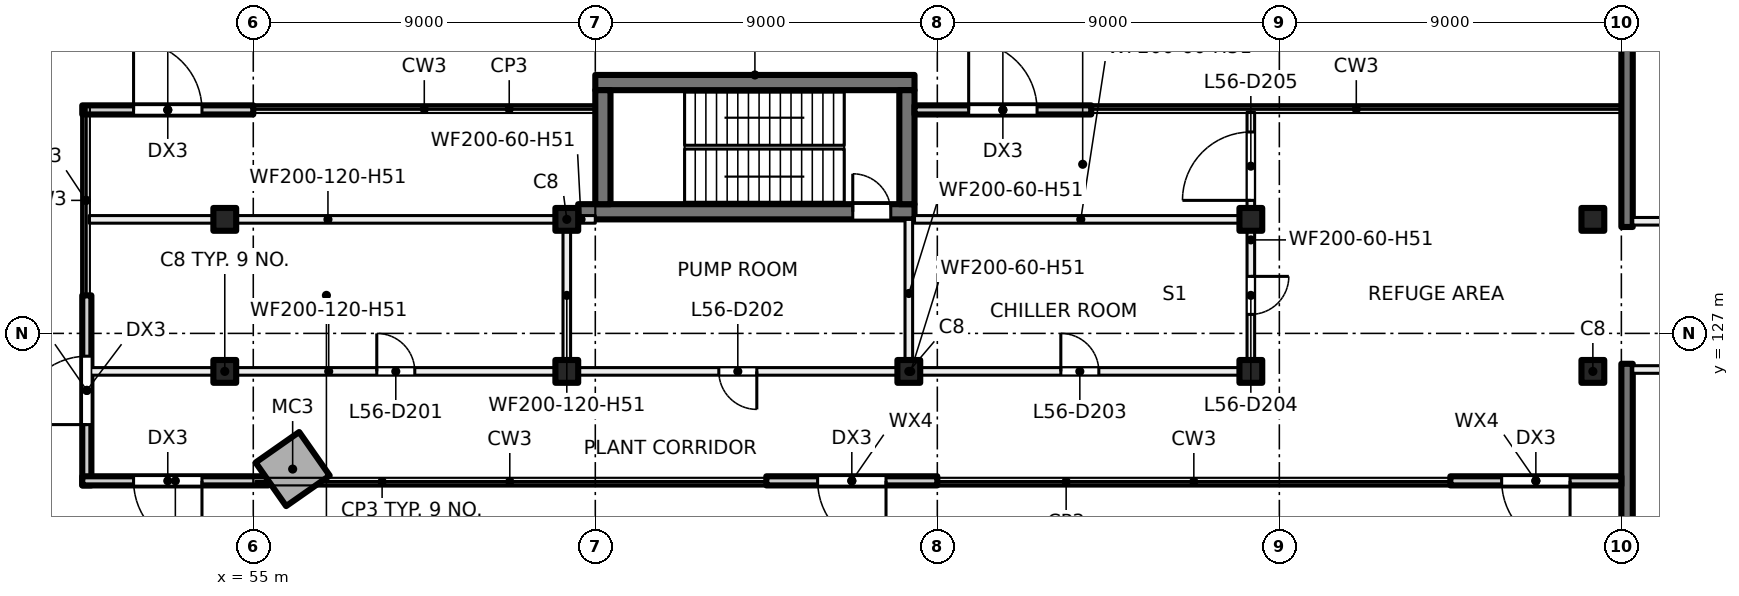
"""IFC4 building model, lengths in metres.
Left out: names, types, materials, properties, quantities, classifications, styles, units other than length and angle.
Written with IfcOpenShell. Run it as: python <this file> out.ifc"""

import sys

from ifc_helpers import new_model, si_unit, direction, frame, frame_2d, origin, origin_2d, place, context, subcontext, project, spatial, rectangle, hollow_rectangle, extrude, element, fill, save


model = new_model("IFC4")
c1 = context("Model", 3, precision=1e-05, world=origin(), true_north=direction((0.0, 1.0)))
c2 = subcontext(c1, "Body", "Model", "MODEL_VIEW")
j1 = project(units=[si_unit("LENGTHUNIT", "METRE"), si_unit("PLANEANGLEUNIT", "RADIAN")], contexts=[c1])
p1 = place(None, origin())
s1 = spatial("IfcSite", under=j1, at=p1, CompositionType="ELEMENT")
p2 = place(p1, origin())
s2 = spatial("IfcBuilding", under=s1, at=p2, CompositionType="ELEMENT")
p3 = place(p2, frame((0.0, 0.0, 236.0)))
s3 = spatial("IfcBuildingStorey", under=s2, at=p3, CompositionType="ELEMENT", Elevation=236.0)
p4 = place(p3, frame((56.036, 123.43, 0.0), z_axis=(0.0, 0.0, 1.0), x_axis=(0.573576436351, -0.819152044289, 0.0)))
e1 = element("IfcColumn", 1, at=p4, inside=s3, PredefinedType="COLUMN", context=c2, shape_type="SweptSolid", body=[
    extrude(hollow_rectangle(XDim=1.4, YDim=1.4, WallThickness=0.032, at=origin_2d()), origin(), (0.0, 0.0, 1.0), 5.5),
])
for number, where, z_axis, x_axis in (
    (2, (54.25, 130.0, 0.0), (0.0, 0.0, 1.0), (1.0, 0.0, 0.0)),
    (3, (63.25, 130.0, 0.0), (0.0, 0.0, 1.0), (1.0, 0.0, 0.0)),
    (4, (81.25, 130.0, 0.0), (0.0, 0.0, 1.0), (1.0, 0.0, 0.0)),
    (5, (90.25, 130.0, 0.0), (0.0, 0.0, 1.0), (1.0, 0.0, 0.0)),
    (6, (54.25, 126.0, 0.0), (0.0, 0.0, 1.0), (1.0, 0.0, 0.0)),
    (7, (63.25, 126.0, 0.0), (0.0, 0.0, 1.0), (1.0, 0.0, 0.0)),
    (8, (72.25, 126.0, 0.0), (0.0, 0.0, 1.0), (1.0, 0.0, 0.0)),
    (9, (81.25, 126.0, 0.0), (0.0, 0.0, 1.0), (1.0, 0.0, 0.0)),
    (10, (90.25, 126.0, 0.0), (0.0, 0.0, 1.0), (1.0, 0.0, 0.0)),
):
    element("IfcColumn", number, at=place(p3, frame(where, z_axis=z_axis, x_axis=x_axis)), inside=s3, PredefinedType="COLUMN", context=c2, shape_type="SweptSolid", body=[
        extrude(rectangle(XDim=0.6, YDim=0.6, at=origin_2d()), origin(), (0.0, 0.0, 1.0), 5.5),
    ])
for number, where, z_axis, x_axis in (
    (11, (91.15, 138.5, 0.0), (0.0, 0.0, 1.0), (0.0, -1.0, 0.0)),
    (12, (91.15, 126.2, 0.0), (0.0, 0.0, 1.0), (0.0, -1.0, 0.0)),
):
    element("IfcWall", number, at=place(p3, frame(where, z_axis=z_axis, x_axis=x_axis)), inside=s3, PredefinedType="SHEAR", context=c2, shape_type="SweptSolid", body=[
        extrude(rectangle(XDim=8.7, YDim=0.3, at=frame_2d((4.35, 0.0))), origin(), (0.0, 0.0, 1.0), 5.5),
    ])
p5 = place(p3, frame((63.55, 130.2, 0.0), z_axis=(0.0, 0.0, 1.0), x_axis=(1.0, 0.0, 0.0)))
e13 = element("IfcWall", 13, at=p5, inside=s3, PredefinedType="SHEAR", context=c2, shape_type="SweptSolid", body=[
    extrude(rectangle(XDim=8.85, YDim=0.4, at=frame_2d((4.425, 0.0))), origin(), (0.0, 0.0, 1.0), 5.5),
])
p6 = place(p5, frame((7.225, 0.0, 0.0)))
e14 = element("IfcOpeningElement", 14, at=p6, cuts=e13, PredefinedType="OPENING", context=c2, shape_type="SweptSolid", body=[
    extrude(rectangle(XDim=1.0, YDim=2.1, at=frame_2d((0.5, 1.05))), frame((0.0, 0.21, 0.0), z_axis=(0.0, -1.0, 0.0), x_axis=(1.0, 0.0, 0.0)), (0.0, 0.0, 1.0), 0.42),
])
p7 = place(p3, frame((64.0, 133.6, 0.0), z_axis=(0.0, 0.0, 1.0), x_axis=(1.0, 0.0, 0.0)))
e15 = element("IfcWall", 15, at=p7, inside=s3, PredefinedType="SHEAR", context=c2, shape_type="SweptSolid", body=[
    extrude(rectangle(XDim=8.4, YDim=0.4, at=frame_2d((4.2, 0.0))), origin(), (0.0, 0.0, 1.0), 5.5),
])
for number, where, z_axis, x_axis in (
    (16, (64.2, 130.4, 0.0), (0.0, 0.0, 1.0), (0.0, 1.0, 0.0)),
    (17, (72.2, 130.4, 0.0), (0.0, 0.0, 1.0), (0.0, 1.0, 0.0)),
):
    element("IfcWall", number, at=place(p3, frame(where, z_axis=z_axis, x_axis=x_axis)), inside=s3, PredefinedType="SHEAR", context=c2, shape_type="SweptSolid", body=[
        extrude(rectangle(XDim=3.0, YDim=0.4, at=frame_2d((1.5, 0.0))), origin(), (0.0, 0.0, 1.0), 5.5),
    ])
p8 = place(p3, frame((50.5, 132.88, 0.0), z_axis=(0.0, 0.0, 1.0), x_axis=(1.0, 0.0, 0.0)))
e18 = element("IfcWall", 18, at=p8, inside=s3, PredefinedType="SOLIDWALL", context=c2, shape_type="SweptSolid", body=[
    extrude(rectangle(XDim=4.5, YDim=0.24, at=frame_2d((2.25, 0.0))), origin(), (0.0, 0.0, 1.0), 5.125),
])
p9 = place(p8, frame((1.35, 0.0, 0.0)))
e19 = element("IfcOpeningElement", 19, at=p9, cuts=e18, PredefinedType="OPENING", context=c2, shape_type="SweptSolid", body=[
    extrude(rectangle(XDim=1.8, YDim=2.4, at=frame_2d((0.9, 1.2))), frame((0.0, 0.13, 0.0), z_axis=(0.0, -1.0, 0.0), x_axis=(1.0, 0.0, 0.0)), (0.0, 0.0, 1.0), 0.26),
])
p10 = place(p3, frame((50.62, 123.0, 0.0), z_axis=(0.0, 0.0, 1.0), x_axis=(0.0, 1.0, 0.0)))
e20 = element("IfcWall", 20, at=p10, inside=s3, PredefinedType="SOLIDWALL", context=c2, shape_type="SweptSolid", body=[
    extrude(rectangle(XDim=5.0, YDim=0.24, at=frame_2d((2.5, 0.0))), origin(), (0.0, 0.0, 1.0), 5.125),
])
p11 = place(p10, frame((1.6, 0.0, 0.0)))
e21 = element("IfcOpeningElement", 21, at=p11, cuts=e20, PredefinedType="OPENING", context=c2, shape_type="SweptSolid", body=[
    extrude(rectangle(XDim=1.8, YDim=2.4, at=frame_2d((0.9, 1.2))), frame((0.0, 0.13, 0.0), z_axis=(0.0, -1.0, 0.0), x_axis=(1.0, 0.0, 0.0)), (0.0, 0.0, 1.0), 0.26),
])
p12 = place(p3, frame((91.0, 123.12, 0.0), z_axis=(0.0, 0.0, 1.0), x_axis=(-1.0, 0.0, 0.0)))
e22 = element("IfcWall", 22, at=p12, inside=s3, PredefinedType="SOLIDWALL", context=c2, shape_type="SweptSolid", body=[
    extrude(rectangle(XDim=4.5, YDim=0.24, at=frame_2d((2.25, 0.0))), origin(), (0.0, 0.0, 1.0), 5.125),
])
p13 = place(p12, frame((1.35, 0.0, 0.0)))
e23 = element("IfcOpeningElement", 23, at=p13, cuts=e22, PredefinedType="OPENING", context=c2, shape_type="SweptSolid", body=[
    extrude(rectangle(XDim=1.8, YDim=2.4, at=frame_2d((0.9, 1.2))), frame((0.0, 0.13, 0.0), z_axis=(0.0, -1.0, 0.0), x_axis=(1.0, 0.0, 0.0)), (0.0, 0.0, 1.0), 0.26),
])
p14 = place(p3, frame((73.0, 123.12, 0.0), z_axis=(0.0, 0.0, 1.0), x_axis=(-1.0, 0.0, 0.0)))
e24 = element("IfcWall", 24, at=p14, inside=s3, PredefinedType="SOLIDWALL", context=c2, shape_type="SweptSolid", body=[
    extrude(rectangle(XDim=4.5, YDim=0.24, at=frame_2d((2.25, 0.0))), origin(), (0.0, 0.0, 1.0), 5.125),
])
p15 = place(p14, frame((1.35, 0.0, 0.0)))
e25 = element("IfcOpeningElement", 25, at=p15, cuts=e24, PredefinedType="OPENING", context=c2, shape_type="SweptSolid", body=[
    extrude(rectangle(XDim=1.8, YDim=2.4, at=frame_2d((0.9, 1.2))), frame((0.0, 0.13, 0.0), z_axis=(0.0, -1.0, 0.0), x_axis=(1.0, 0.0, 0.0)), (0.0, 0.0, 1.0), 0.26),
])
p16 = place(p3, frame((55.399, 123.12, 0.0), z_axis=(0.0, 0.0, 1.0), x_axis=(-1.0, 0.0, 0.0)))
e26 = element("IfcWall", 26, at=p16, inside=s3, PredefinedType="SOLIDWALL", context=c2, shape_type="SweptSolid", body=[
    extrude(rectangle(XDim=4.899, YDim=0.24, at=frame_2d((2.449, 0.0))), origin(), (0.0, 0.0, 1.0), 5.125),
])
p17 = place(p16, frame((1.749, 0.0, 0.0)))
e27 = element("IfcOpeningElement", 27, at=p17, cuts=e26, PredefinedType="OPENING", context=c2, shape_type="SweptSolid", body=[
    extrude(rectangle(XDim=1.8, YDim=2.4, at=frame_2d((0.9, 1.2))), frame((0.0, 0.13, 0.0), z_axis=(0.0, -1.0, 0.0), x_axis=(1.0, 0.0, 0.0)), (0.0, 0.0, 1.0), 0.26),
])
p18 = place(p3, frame((72.4, 132.88, 0.0), z_axis=(0.0, 0.0, 1.0), x_axis=(1.0, 0.0, 0.0)))
e28 = element("IfcWall", 28, at=p18, inside=s3, PredefinedType="SOLIDWALL", context=c2, shape_type="SweptSolid", body=[
    extrude(rectangle(XDim=4.65, YDim=0.24, at=frame_2d((2.325, 0.0))), origin(), (0.0, 0.0, 1.0), 5.125),
])
p19 = place(p18, frame((1.425, 0.0, 0.0)))
e29 = element("IfcOpeningElement", 29, at=p19, cuts=e28, PredefinedType="OPENING", context=c2, shape_type="SweptSolid", body=[
    extrude(rectangle(XDim=1.8, YDim=2.4, at=frame_2d((0.9, 1.2))), frame((0.0, 0.13, 0.0), z_axis=(0.0, -1.0, 0.0), x_axis=(1.0, 0.0, 0.0)), (0.0, 0.0, 1.0), 0.26),
])
p20 = place(p3, frame((95.25, 126.05, 0.0), z_axis=(0.0, 0.0, 1.0), x_axis=(-1.0, 0.0, 0.0)))
e30 = element("IfcWall", 30, at=p20, inside=s3, PredefinedType="PARTITIONING", context=c2, shape_type="SweptSolid", body=[
    extrude(rectangle(XDim=3.95, YDim=0.2, at=frame_2d((1.975, 0.0))), origin(), (0.0, 0.0, 1.0), 5.125),
])
p21 = place(p20, frame((0.3, 0.0, 0.0)))
e31 = element("IfcOpeningElement", 31, at=p21, cuts=e30, PredefinedType="OPENING", context=c2, shape_type="SweptSolid", body=[
    extrude(rectangle(XDim=1.2, YDim=2.1, at=frame_2d((0.6, 1.05))), frame((0.0, 0.11, 0.0), z_axis=(0.0, -1.0, 0.0), x_axis=(1.0, 0.0, 0.0)), (0.0, 0.0, 1.0), 0.22),
])
p22 = place(p3, frame((91.3, 129.95, 0.0), z_axis=(0.0, 0.0, 1.0), x_axis=(1.0, 0.0, 0.0)))
e32 = element("IfcWall", 32, at=p22, inside=s3, PredefinedType="PARTITIONING", context=c2, shape_type="SweptSolid", body=[
    extrude(rectangle(XDim=3.95, YDim=0.2, at=frame_2d((1.975, 0.0))), origin(), (0.0, 0.0, 1.0), 5.125),
])
p23 = place(p22, frame((2.45, 0.0, 0.0)))
e33 = element("IfcOpeningElement", 33, at=p23, cuts=e32, PredefinedType="OPENING", context=c2, shape_type="SweptSolid", body=[
    extrude(rectangle(XDim=1.2, YDim=2.1, at=frame_2d((0.6, 1.05))), frame((0.0, 0.11, 0.0), z_axis=(0.0, -1.0, 0.0), x_axis=(1.0, 0.0, 0.0)), (0.0, 0.0, 1.0), 0.22),
])
p24 = place(p3, frame((50.72, 126.0, 0.0), z_axis=(0.0, 0.0, 1.0), x_axis=(1.0, 0.0, 0.0)))
e34 = element("IfcWall", 34, at=p24, inside=s3, PredefinedType="PARTITIONING", context=c2, shape_type="SweptSolid", body=[
    extrude(rectangle(XDim=12.53, YDim=0.2, at=frame_2d((6.265, 0.0))), origin(), (0.0, 0.0, 1.0), 5.125),
])
p25 = place(p24, frame((7.53, 0.0, 0.0)))
e35 = element("IfcOpeningElement", 35, at=p25, cuts=e34, PredefinedType="OPENING", context=c2, shape_type="SweptSolid", body=[
    extrude(rectangle(XDim=1.0, YDim=2.1, at=frame_2d((0.5, 1.05))), frame((0.0, 0.11, 0.0), z_axis=(0.0, -1.0, 0.0), x_axis=(1.0, 0.0, 0.0)), (0.0, 0.0, 1.0), 0.22),
])
p26 = place(p3, frame((50.68, 130.0, 0.0), z_axis=(0.0, 0.0, 1.0), x_axis=(1.0, 0.0, 0.0)))
e36 = element("IfcWall", 36, at=p26, inside=s3, PredefinedType="PARTITIONING", context=c2, shape_type="SweptSolid", body=[
    extrude(rectangle(XDim=12.57, YDim=0.2, at=frame_2d((6.285, 0.0))), origin(), (0.0, 0.0, 1.0), 5.125),
])
p27 = place(p3, frame((63.25, 126.1, 0.0), z_axis=(0.0, 0.0, 1.0), x_axis=(0.0, 1.0, 0.0)))
e37 = element("IfcWall", 37, at=p27, inside=s3, PredefinedType="PARTITIONING", context=c2, shape_type="SweptSolid", body=[
    extrude(rectangle(XDim=3.8, YDim=0.2, at=frame_2d((1.9, 0.0))), origin(), (0.0, 0.0, 1.0), 5.125),
])
p28 = place(p3, frame((63.25, 126.0, 0.0), z_axis=(0.0, 0.0, 1.0), x_axis=(1.0, 0.0, 0.0)))
e38 = element("IfcWall", 38, at=p28, inside=s3, PredefinedType="PARTITIONING", context=c2, shape_type="SweptSolid", body=[
    extrude(rectangle(XDim=18.1, YDim=0.2, at=frame_2d((9.05, 0.0))), origin(), (0.0, 0.0, 1.0), 5.125),
])
p29 = place(p28, frame((4.0, 0.0, 0.0)))
e39 = element("IfcOpeningElement", 39, at=p29, cuts=e38, PredefinedType="OPENING", context=c2, shape_type="SweptSolid", body=[
    extrude(rectangle(XDim=1.0, YDim=2.1, at=frame_2d((0.5, 1.05))), frame((0.0, 0.11, 0.0), z_axis=(0.0, -1.0, 0.0), x_axis=(1.0, 0.0, 0.0)), (0.0, 0.0, 1.0), 0.22),
])
p30 = place(p28, frame((13.0, 0.0, 0.0)))
e40 = element("IfcOpeningElement", 40, at=p30, cuts=e38, PredefinedType="OPENING", context=c2, shape_type="SweptSolid", body=[
    extrude(rectangle(XDim=1.0, YDim=2.1, at=frame_2d((0.5, 1.05))), frame((0.0, 0.11, 0.0), z_axis=(0.0, -1.0, 0.0), x_axis=(1.0, 0.0, 0.0)), (0.0, 0.0, 1.0), 0.22),
])
p31 = place(p3, frame((63.25, 130.0, 0.0), z_axis=(0.0, 0.0, 1.0), x_axis=(1.0, 0.0, 0.0)))
e41 = element("IfcWall", 41, at=p31, inside=s3, PredefinedType="PARTITIONING", context=c2, shape_type="SweptSolid", body=[
    extrude(rectangle(XDim=0.75, YDim=0.2, at=frame_2d((0.375, 0.0))), origin(), (0.0, 0.0, 1.0), 5.125),
])
p32 = place(p3, frame((72.25, 126.1, 0.0), z_axis=(0.0, 0.0, 1.0), x_axis=(0.0, 1.0, 0.0)))
e42 = element("IfcWall", 42, at=p32, inside=s3, PredefinedType="PARTITIONING", context=c2, shape_type="SweptSolid", body=[
    extrude(rectangle(XDim=3.9, YDim=0.2, at=frame_2d((1.95, 0.0))), origin(), (0.0, 0.0, 1.0), 5.125),
])
p33 = place(p3, frame((72.4, 130.0, 0.0), z_axis=(0.0, 0.0, 1.0), x_axis=(1.0, 0.0, 0.0)))
e43 = element("IfcWall", 43, at=p33, inside=s3, PredefinedType="PARTITIONING", context=c2, shape_type="SweptSolid", body=[
    extrude(rectangle(XDim=8.75, YDim=0.2, at=frame_2d((4.375, 0.0))), origin(), (0.0, 0.0, 1.0), 5.125),
])
p34 = place(p3, frame((81.25, 126.1, 0.0), z_axis=(0.0, 0.0, 1.0), x_axis=(0.0, 1.0, 0.0)))
e44 = element("IfcWall", 44, at=p34, inside=s3, PredefinedType="PARTITIONING", context=c2, shape_type="SweptSolid", body=[
    extrude(rectangle(XDim=6.72, YDim=0.2, at=frame_2d((3.36, 0.0))), origin(), (0.0, 0.0, 1.0), 5.125),
])
p35 = place(p34, frame((1.4, 0.0, 0.0)))
e45 = element("IfcOpeningElement", 45, at=p35, cuts=e44, PredefinedType="OPENING", context=c2, shape_type="SweptSolid", body=[
    extrude(rectangle(XDim=1.0, YDim=2.1, at=frame_2d((0.5, 1.05))), frame((0.0, 0.11, 0.0), z_axis=(0.0, -1.0, 0.0), x_axis=(1.0, 0.0, 0.0)), (0.0, 0.0, 1.0), 0.22),
])
p36 = place(p34, frame((4.4, 0.0, 0.0)))
e46 = element("IfcOpeningElement", 46, at=p36, cuts=e44, PredefinedType="OPENING", context=c2, shape_type="SweptSolid", body=[
    extrude(rectangle(XDim=1.8, YDim=2.1, at=frame_2d((0.9, 1.05))), frame((0.0, 0.11, 0.0), z_axis=(0.0, -1.0, 0.0), x_axis=(1.0, 0.0, 0.0)), (0.0, 0.0, 1.0), 0.22),
])
p37 = place(p9, origin())
e47 = element("IfcDoor", 47, at=p37, inside=s3, OperationType="DOUBLE_DOOR_SINGLE_SWING", PredefinedType="DOOR", context=c2, shape_type="SweptSolid", body=[
    extrude(rectangle(XDim=1.8, YDim=2.4, at=frame_2d((0.9, 1.2))), frame((0.0, 0.025, 0.0), z_axis=(0.0, -1.0, 0.0), x_axis=(1.0, 0.0, 0.0)), (0.0, 0.0, 1.0), 0.05),
])
fill(e19, e47)
p38 = place(p11, origin())
e48 = element("IfcDoor", 48, at=p38, inside=s3, OperationType="DOUBLE_DOOR_SINGLE_SWING", PredefinedType="DOOR", context=c2, shape_type="SweptSolid", body=[
    extrude(rectangle(XDim=1.8, YDim=2.4, at=frame_2d((0.9, 1.2))), frame((0.0, 0.025, 0.0), z_axis=(0.0, -1.0, 0.0), x_axis=(1.0, 0.0, 0.0)), (0.0, 0.0, 1.0), 0.05),
])
fill(e21, e48)
p39 = place(p13, origin())
e49 = element("IfcDoor", 49, at=p39, inside=s3, OperationType="DOUBLE_DOOR_SINGLE_SWING", PredefinedType="DOOR", context=c2, shape_type="SweptSolid", body=[
    extrude(rectangle(XDim=1.8, YDim=2.4, at=frame_2d((0.9, 1.2))), frame((0.0, 0.025, 0.0), z_axis=(0.0, -1.0, 0.0), x_axis=(1.0, 0.0, 0.0)), (0.0, 0.0, 1.0), 0.05),
])
fill(e23, e49)
p40 = place(p15, origin())
e50 = element("IfcDoor", 50, at=p40, inside=s3, OperationType="DOUBLE_DOOR_SINGLE_SWING", PredefinedType="DOOR", context=c2, shape_type="SweptSolid", body=[
    extrude(rectangle(XDim=1.8, YDim=2.4, at=frame_2d((0.9, 1.2))), frame((0.0, 0.025, 0.0), z_axis=(0.0, -1.0, 0.0), x_axis=(1.0, 0.0, 0.0)), (0.0, 0.0, 1.0), 0.05),
])
fill(e25, e50)
p41 = place(p17, origin())
e51 = element("IfcDoor", 51, at=p41, inside=s3, OperationType="DOUBLE_DOOR_SINGLE_SWING", PredefinedType="DOOR", context=c2, shape_type="SweptSolid", body=[
    extrude(rectangle(XDim=1.8, YDim=2.4, at=frame_2d((0.9, 1.2))), frame((0.0, 0.025, 0.0), z_axis=(0.0, -1.0, 0.0), x_axis=(1.0, 0.0, 0.0)), (0.0, 0.0, 1.0), 0.05),
])
fill(e27, e51)
p42 = place(p19, origin())
e52 = element("IfcDoor", 52, at=p42, inside=s3, OperationType="DOUBLE_DOOR_SINGLE_SWING", PredefinedType="DOOR", context=c2, shape_type="SweptSolid", body=[
    extrude(rectangle(XDim=1.8, YDim=2.4, at=frame_2d((0.9, 1.2))), frame((0.0, 0.025, 0.0), z_axis=(0.0, -1.0, 0.0), x_axis=(1.0, 0.0, 0.0)), (0.0, 0.0, 1.0), 0.05),
])
fill(e29, e52)
p43 = place(p6, origin())
e53 = element("IfcDoor", 53, at=p43, inside=s3, OperationType="SINGLE_SWING_LEFT", PredefinedType="DOOR", context=c2, shape_type="SweptSolid", body=[
    extrude(rectangle(XDim=1.0, YDim=2.1, at=frame_2d((0.5, 1.05))), frame((0.0, 0.025, 0.0), z_axis=(0.0, -1.0, 0.0), x_axis=(1.0, 0.0, 0.0)), (0.0, 0.0, 1.0), 0.05),
])
fill(e14, e53)
p44 = place(p25, origin())
e54 = element("IfcDoor", 54, at=p44, inside=s3, OperationType="SINGLE_SWING_LEFT", PredefinedType="DOOR", context=c2, shape_type="SweptSolid", body=[
    extrude(rectangle(XDim=1.0, YDim=2.1, at=frame_2d((0.5, 1.05))), frame((0.0, 0.025, 0.0), z_axis=(0.0, -1.0, 0.0), x_axis=(1.0, 0.0, 0.0)), (0.0, 0.0, 1.0), 0.05),
])
fill(e35, e54)
p45 = place(p29, origin())
e55 = element("IfcDoor", 55, at=p45, inside=s3, OperationType="SINGLE_SWING_RIGHT", PredefinedType="DOOR", context=c2, shape_type="SweptSolid", body=[
    extrude(rectangle(XDim=1.0, YDim=2.1, at=frame_2d((0.5, 1.05))), frame((0.0, 0.025, 0.0), z_axis=(0.0, -1.0, 0.0), x_axis=(1.0, 0.0, 0.0)), (0.0, 0.0, 1.0), 0.05),
])
fill(e39, e55)
p46 = place(p30, origin())
e56 = element("IfcDoor", 56, at=p46, inside=s3, OperationType="SINGLE_SWING_LEFT", PredefinedType="DOOR", context=c2, shape_type="SweptSolid", body=[
    extrude(rectangle(XDim=1.0, YDim=2.1, at=frame_2d((0.5, 1.05))), frame((0.0, 0.025, 0.0), z_axis=(0.0, -1.0, 0.0), x_axis=(1.0, 0.0, 0.0)), (0.0, 0.0, 1.0), 0.05),
])
fill(e40, e56)
p47 = place(p35, origin())
e57 = element("IfcDoor", 57, at=p47, inside=s3, OperationType="SINGLE_SWING_RIGHT", PredefinedType="DOOR", context=c2, shape_type="SweptSolid", body=[
    extrude(rectangle(XDim=1.0, YDim=2.1, at=frame_2d((0.5, 1.05))), frame((0.0, 0.025, 0.0), z_axis=(0.0, -1.0, 0.0), x_axis=(1.0, 0.0, 0.0)), (0.0, 0.0, 1.0), 0.05),
])
fill(e45, e57)
p48 = place(p36, origin())
e58 = element("IfcDoor", 58, at=p48, inside=s3, OperationType="DOUBLE_DOOR_SINGLE_SWING", PredefinedType="DOOR", context=c2, shape_type="SweptSolid", body=[
    extrude(rectangle(XDim=1.8, YDim=2.1, at=frame_2d((0.9, 1.05))), frame((0.0, 0.025, 0.0), z_axis=(0.0, -1.0, 0.0), x_axis=(1.0, 0.0, 0.0)), (0.0, 0.0, 1.0), 0.05),
])
fill(e46, e58)
save(model, sys.argv[1])
